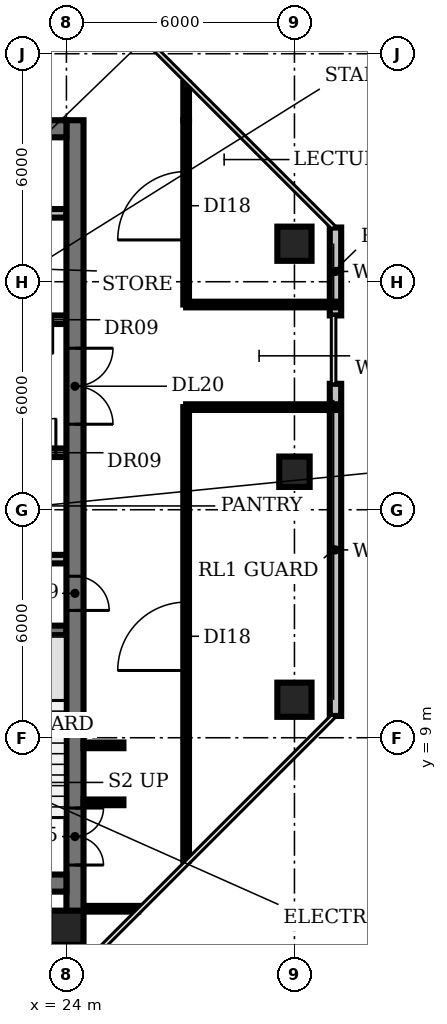
"""IFC4 building model, lengths in metres.
Left out: names, types, materials, properties, quantities, classifications, styles, units other than length and angle.
Written with IfcOpenShell. Run it as: python <this file> out.ifc"""

import sys

from ifc_helpers import new_model, si_unit, direction, frame, frame_2d, origin, origin_2d, place, context, subcontext, project, spatial, rectangle, circle, extrude, element, fill, save


model = new_model("IFC4")
c1 = context("Model", 3, precision=1e-05, world=origin(), true_north=direction((0.0, 1.0)))
c2 = subcontext(c1, "Body", "Model", "MODEL_VIEW")
j1 = project(units=[si_unit("LENGTHUNIT", "METRE"), si_unit("PLANEANGLEUNIT", "RADIAN")], contexts=[c1])
p1 = place(None, origin())
s1 = spatial("IfcSite", under=j1, at=p1, CompositionType="ELEMENT")
p2 = place(p1, origin())
s2 = spatial("IfcBuilding", under=s1, at=p2, CompositionType="ELEMENT")
p3 = place(p2, frame((0.0, 0.0, 243.2)))
s3 = spatial("IfcBuildingStorey", under=s2, at=p3, CompositionType="ELEMENT", Elevation=243.2)
for number, where, z_axis, x_axis in (
    (1, (24.0, 4.0, 0.0), (0.0, 0.0, 1.0), (1.0, 0.0, 0.0)),
    (2, (30.0, 10.0, 0.0), (0.0, 0.0, 1.0), (1.0, 0.0, 0.0)),
):
    element("IfcColumn", number, at=place(p3, frame(where, z_axis=z_axis, x_axis=x_axis)), inside=s3, PredefinedType="COLUMN", context=c2, shape_type="SweptSolid", body=[
        extrude(circle(Radius=0.45, at=origin_2d()), origin(), (0.0, 0.0, 1.0), 3.85),
    ])
p4 = place(p3, frame((30.0, 16.0, 0.0), z_axis=(0.0, 0.0, 1.0), x_axis=(1.0, 0.0, 0.0)))
e3 = element("IfcColumn", 3, at=p4, inside=s3, PredefinedType="COLUMN", context=c2, shape_type="SweptSolid", body=[
    extrude(rectangle(XDim=0.8, YDim=0.8, at=origin_2d()), origin(), (0.0, 0.0, 1.0), 3.85),
])
p5 = place(p3, frame((30.0, 22.0, 0.0), z_axis=(0.0, 0.0, 1.0), x_axis=(1.0, 0.0, 0.0)))
e4 = element("IfcColumn", 4, at=p5, inside=s3, PredefinedType="COLUMN", context=c2, shape_type="SweptSolid", body=[
    extrude(circle(Radius=0.45, at=origin_2d()), origin(), (0.0, 0.0, 1.0), 3.85),
])
p6 = place(p3, frame((31.08, 9.573, 0.0), z_axis=(0.0, 0.0, 1.0), x_axis=(0.0, 1.0, 0.0)))
e5 = element("IfcWall", 5, at=p6, inside=s3, PredefinedType="SOLIDWALL", context=c2, shape_type="SweptSolid", body=[
    extrude(rectangle(XDim=8.74, YDim=0.3, at=frame_2d((4.37, 0.0))), origin(), (0.0, 0.0, 1.0), 3.85),
])
p7 = place(p3, frame((31.08, 20.113, 0.0), z_axis=(0.0, 0.0, 1.0), x_axis=(0.0, 1.0, 0.0)))
e6 = element("IfcWall", 6, at=p7, inside=s3, PredefinedType="SOLIDWALL", context=c2, shape_type="SweptSolid", body=[
    extrude(rectangle(XDim=2.313, YDim=0.3, at=frame_2d((1.157, 0.0))), origin(), (0.0, 0.0, 1.0), 3.85),
])
p8 = place(p3, frame((20.85, 11.825, 0.0), z_axis=(0.0, 0.0, 1.0), x_axis=(1.0, 0.0, 0.0)))
e7 = element("IfcWall", 7, at=p8, inside=s3, PredefinedType="SHEAR", context=c2, shape_type="SweptSolid", body=[
    extrude(rectangle(XDim=3.15, YDim=0.25, at=frame_2d((1.575, 0.0))), origin(), (0.0, 0.0, 1.0), 3.85),
])
p9 = place(p3, frame((16.6, 13.7, 0.0), z_axis=(0.0, 0.0, 1.0), x_axis=(1.0, 0.0, 0.0)))
e8 = element("IfcWall", 8, at=p9, inside=s3, PredefinedType="PARTITIONING", context=c2, shape_type="SweptSolid", body=[
    extrude(rectangle(XDim=7.4, YDim=0.225, at=frame_2d((3.7, 0.0))), origin(), (0.0, 0.0, 1.0), 3.85),
])
p10 = place(p3, frame((9.4, 16.5, 0.0), z_axis=(0.0, 0.0, 1.0), x_axis=(1.0, 0.0, 0.0)))
e9 = element("IfcWall", 9, at=p10, inside=s3, PredefinedType="PARTITIONING", context=c2, shape_type="SweptSolid", body=[
    extrude(rectangle(XDim=14.6, YDim=0.225, at=frame_2d((7.3, 0.0))), origin(), (0.0, 0.0, 1.0), 3.85),
])
p11 = place(p10, frame((0.55, 0.0, 0.0)))
e10 = element("IfcOpeningElement", 10, at=p11, cuts=e9, PredefinedType="OPENING", context=c2, shape_type="SweptSolid", body=[
    extrude(rectangle(XDim=0.9, YDim=2.1, at=frame_2d((0.45, 1.05))), frame((0.0, 0.123, 0.0), z_axis=(0.0, -1.0, 0.0), x_axis=(1.0, 0.0, 0.0)), (0.0, 0.0, 1.0), 0.245),
])
p12 = place(p10, frame((6.075, 0.0, 0.0)))
e11 = element("IfcOpeningElement", 11, at=p12, cuts=e9, PredefinedType="OPENING", context=c2, shape_type="SweptSolid", body=[
    extrude(rectangle(XDim=1.0, YDim=2.1, at=frame_2d((0.5, 1.05))), frame((0.0, 0.123, 0.0), z_axis=(0.0, -1.0, 0.0), x_axis=(1.0, 0.0, 0.0)), (0.0, 0.0, 1.0), 0.245),
])
p13 = place(p10, frame((11.647, 0.0, 0.0)))
e12 = element("IfcOpeningElement", 12, at=p13, cuts=e9, PredefinedType="OPENING", context=c2, shape_type="SweptSolid", body=[
    extrude(rectangle(XDim=0.9, YDim=2.1, at=frame_2d((0.45, 1.05))), frame((0.0, 0.123, 0.0), z_axis=(0.0, -1.0, 0.0), x_axis=(1.0, 0.0, 0.0)), (0.0, 0.0, 1.0), 0.245),
])
p14 = place(p10, frame((13.423, 0.0, 0.0)))
e13 = element("IfcOpeningElement", 13, at=p14, cuts=e9, PredefinedType="OPENING", context=c2, shape_type="SweptSolid", body=[
    extrude(rectangle(XDim=0.9, YDim=2.1, at=frame_2d((0.45, 1.05))), frame((0.0, 0.123, 0.0), z_axis=(0.0, -1.0, 0.0), x_axis=(1.0, 0.0, 0.0)), (0.0, 0.0, 1.0), 0.245),
])
p15 = place(p3, frame((24.0, 20.0, 0.0), z_axis=(0.0, 0.0, 1.0), x_axis=(-1.0, 0.0, 0.0)))
e14 = element("IfcWall", 14, at=p15, inside=s3, PredefinedType="PARTITIONING", context=c2, shape_type="SweptSolid", body=[
    extrude(rectangle(XDim=14.6, YDim=0.225, at=frame_2d((7.3, 0.0))), origin(), (0.0, 0.0, 1.0), 3.85),
])
p16 = place(p15, frame((12.75, 0.0, 0.0)))
e15 = element("IfcOpeningElement", 15, at=p16, cuts=e14, PredefinedType="OPENING", context=c2, shape_type="SweptSolid", body=[
    extrude(rectangle(XDim=1.1, YDim=2.1, at=frame_2d((0.55, 1.05))), frame((0.0, 0.123, 0.0), z_axis=(0.0, -1.0, 0.0), x_axis=(1.0, 0.0, 0.0)), (0.0, 0.0, 1.0), 0.245),
])
p17 = place(p15, frame((9.95, 0.0, 0.0)))
e16 = element("IfcOpeningElement", 16, at=p17, cuts=e14, PredefinedType="OPENING", context=c2, shape_type="SweptSolid", body=[
    extrude(rectangle(XDim=1.1, YDim=2.1, at=frame_2d((0.55, 1.05))), frame((0.0, 0.123, 0.0), z_axis=(0.0, -1.0, 0.0), x_axis=(1.0, 0.0, 0.0)), (0.0, 0.0, 1.0), 0.245),
])
p18 = place(p15, frame((7.15, 0.0, 0.0)))
e17 = element("IfcOpeningElement", 17, at=p18, cuts=e14, PredefinedType="OPENING", context=c2, shape_type="SweptSolid", body=[
    extrude(rectangle(XDim=1.1, YDim=2.1, at=frame_2d((0.55, 1.05))), frame((0.0, 0.123, 0.0), z_axis=(0.0, -1.0, 0.0), x_axis=(1.0, 0.0, 0.0)), (0.0, 0.0, 1.0), 0.245),
])
p19 = place(p15, frame((4.35, 0.0, 0.0)))
e18 = element("IfcOpeningElement", 18, at=p19, cuts=e14, PredefinedType="OPENING", context=c2, shape_type="SweptSolid", body=[
    extrude(rectangle(XDim=1.1, YDim=2.1, at=frame_2d((0.55, 1.05))), frame((0.0, 0.123, 0.0), z_axis=(0.0, -1.0, 0.0), x_axis=(1.0, 0.0, 0.0)), (0.0, 0.0, 1.0), 0.245),
])
p20 = place(p15, frame((2.137, 0.0, 0.0)))
e19 = element("IfcOpeningElement", 19, at=p20, cuts=e14, PredefinedType="OPENING", context=c2, shape_type="SweptSolid", body=[
    extrude(rectangle(XDim=0.9, YDim=2.1, at=frame_2d((0.45, 1.05))), frame((0.0, 0.123, 0.0), z_axis=(0.0, -1.0, 0.0), x_axis=(1.0, 0.0, 0.0)), (0.0, 0.0, 1.0), 0.245),
])
p21 = place(p15, frame((0.363, 0.0, 0.0)))
e20 = element("IfcOpeningElement", 20, at=p21, cuts=e14, PredefinedType="OPENING", context=c2, shape_type="SweptSolid", body=[
    extrude(rectangle(XDim=0.9, YDim=2.1, at=frame_2d((0.45, 1.05))), frame((0.0, 0.123, 0.0), z_axis=(0.0, -1.0, 0.0), x_axis=(1.0, 0.0, 0.0)), (0.0, 0.0, 1.0), 0.245),
])
p22 = place(p3, frame((9.4, 22.8, 0.0), z_axis=(0.0, 0.0, 1.0), x_axis=(1.0, 0.0, 0.0)))
e21 = element("IfcWall", 21, at=p22, inside=s3, PredefinedType="PARTITIONING", context=c2, shape_type="SweptSolid", body=[
    extrude(rectangle(XDim=14.6, YDim=0.225, at=frame_2d((7.3, 0.0))), origin(), (0.0, 0.0, 1.0), 3.85),
])
p23 = place(p3, frame((24.225, 25.25, 0.0), z_axis=(0.0, 0.0, 1.0), x_axis=(0.0, -1.0, 0.0)))
e22 = element("IfcWall", 22, at=p23, inside=s3, PredefinedType="SHEAR", context=c2, shape_type="SweptSolid", body=[
    extrude(rectangle(XDim=20.83, YDim=0.45, at=frame_2d((10.415, 0.0))), origin(), (0.0, 0.0, 1.0), 3.85),
])
p24 = place(p23, frame((18.1, 0.0, 0.0)))
e23 = element("IfcOpeningElement", 23, at=p24, cuts=e22, PredefinedType="OPENING", context=c2, shape_type="SweptSolid", body=[
    extrude(rectangle(XDim=1.5, YDim=2.1, at=frame_2d((0.75, 1.05))), frame((0.0, 0.235, 0.0), z_axis=(0.0, -1.0, 0.0), x_axis=(1.0, 0.0, 0.0)), (0.0, 0.0, 1.0), 0.47),
])
p25 = place(p23, frame((12.0, 0.0, 0.0)))
e24 = element("IfcOpeningElement", 24, at=p25, cuts=e22, PredefinedType="OPENING", context=c2, shape_type="SweptSolid", body=[
    extrude(rectangle(XDim=0.9, YDim=2.1, at=frame_2d((0.45, 1.05))), frame((0.0, 0.235, 0.0), z_axis=(0.0, -1.0, 0.0), x_axis=(1.0, 0.0, 0.0)), (0.0, 0.0, 1.0), 0.47),
])
p26 = place(p23, frame((6.0, 0.0, 0.0)))
e25 = element("IfcOpeningElement", 25, at=p26, cuts=e22, PredefinedType="OPENING", context=c2, shape_type="SweptSolid", body=[
    extrude(rectangle(XDim=2.0, YDim=2.1, at=frame_2d((1.0, 1.05))), frame((0.0, 0.235, 0.0), z_axis=(0.0, -1.0, 0.0), x_axis=(1.0, 0.0, 0.0)), (0.0, 0.0, 1.0), 0.47),
])
p27 = place(p3, frame((24.0, 5.175, 0.0), z_axis=(0.0, 0.0, 1.0), x_axis=(-1.0, 0.0, 0.0)))
e26 = element("IfcWall", 26, at=p27, inside=s3, PredefinedType="SHEAR", context=c2, shape_type="SweptSolid", body=[
    extrude(rectangle(XDim=18.0, YDim=0.45, at=frame_2d((9.0, 0.0))), origin(), (0.0, 0.0, 1.0), 3.85),
])
p28 = place(p27, frame((0.825, 0.0, 0.0)))
e27 = element("IfcOpeningElement", 27, at=p28, cuts=e26, PredefinedType="OPENING", context=c2, shape_type="SweptSolid", body=[
    extrude(rectangle(XDim=1.5, YDim=2.1, at=frame_2d((0.75, 1.05))), frame((0.0, 0.235, 0.0), z_axis=(0.0, -1.0, 0.0), x_axis=(1.0, 0.0, 0.0)), (0.0, 0.0, 1.0), 0.47),
])
p29 = place(p27, frame((15.675, 0.0, 0.0)))
e28 = element("IfcOpeningElement", 28, at=p29, cuts=e26, PredefinedType="OPENING", context=c2, shape_type="SweptSolid", body=[
    extrude(rectangle(XDim=1.5, YDim=2.1, at=frame_2d((0.75, 1.05))), frame((0.0, 0.235, 0.0), z_axis=(0.0, -1.0, 0.0), x_axis=(1.0, 0.0, 0.0)), (0.0, 0.0, 1.0), 0.47),
])
p30 = place(p27, frame((13.0, 0.0, 0.0)))
e29 = element("IfcOpeningElement", 29, at=p30, cuts=e26, PredefinedType="OPENING", context=c2, shape_type="SweptSolid", body=[
    extrude(rectangle(XDim=1.2, YDim=2.1, at=frame_2d((0.6, 1.05))), frame((0.0, 0.235, 0.0), z_axis=(0.0, -1.0, 0.0), x_axis=(1.0, 0.0, 0.0)), (0.0, 0.0, 1.0), 0.47),
])
p31 = place(p27, frame((4.4, 0.0, 0.0)))
e30 = element("IfcOpeningElement", 30, at=p31, cuts=e26, PredefinedType="OPENING", context=c2, shape_type="SweptSolid", body=[
    extrude(rectangle(XDim=1.0, YDim=2.1, at=frame_2d((0.5, 1.05))), frame((0.0, 0.235, 0.0), z_axis=(0.0, -1.0, 0.0), x_axis=(1.0, 0.0, 0.0)), (0.0, 0.0, 1.0), 0.47),
])
p32 = place(p3, frame((6.0, 25.025, 0.0), z_axis=(0.0, 0.0, 1.0), x_axis=(1.0, 0.0, 0.0)))
e31 = element("IfcWall", 31, at=p32, inside=s3, PredefinedType="SHEAR", context=c2, shape_type="SweptSolid", body=[
    extrude(rectangle(XDim=18.0, YDim=0.45, at=frame_2d((9.0, 0.0))), origin(), (0.0, 0.0, 1.0), 3.85),
])
for number, where, z_axis, x_axis in (
    (32, (24.45, 7.3, 0.0), (0.0, 0.0, 1.0), (1.0, 0.0, 0.0)),
    (33, (24.45, 8.8, 0.0), (0.0, 0.0, 1.0), (1.0, 0.0, 0.0)),
):
    element("IfcWall", number, at=place(p3, frame(where, z_axis=z_axis, x_axis=x_axis)), inside=s3, PredefinedType="PARTITIONING", context=c2, shape_type="SweptSolid", body=[
        extrude(rectangle(XDim=1.05, YDim=0.15, at=frame_2d((0.525, 0.0))), origin(), (0.0, 0.0, 1.0), 2.88),
    ])
p33 = place(p3, frame((24.55, 4.5, 0.0), z_axis=(0.0, 0.0, 1.0), x_axis=(1.0, 0.0, 0.0)))
e34 = element("IfcWall", 34, at=p33, inside=s3, PredefinedType="PARTITIONING", context=c2, shape_type="SweptSolid", body=[
    extrude(rectangle(XDim=1.34, YDim=0.15, at=frame_2d((0.67, 0.0))), origin(), (0.0, 0.0, 1.0), 2.88),
])
p34 = place(p3, frame((27.15, 5.77, 0.0), z_axis=(0.0, 0.0, 1.0), x_axis=(0.0, 1.0, 0.0)))
e35 = element("IfcWall", 35, at=p34, inside=s3, PredefinedType="PARTITIONING", context=c2, shape_type="SweptSolid", body=[
    extrude(rectangle(XDim=11.93, YDim=0.15, at=frame_2d((5.965, 0.0))), origin(), (0.0, 0.0, 1.0), 2.88),
])
p35 = place(p34, frame((5.0, 0.0, 0.0)))
e36 = element("IfcOpeningElement", 36, at=p35, cuts=e35, PredefinedType="OPENING", context=c2, shape_type="SweptSolid", body=[
    extrude(rectangle(XDim=1.8, YDim=2.1, at=frame_2d((0.9, 1.05))), frame((0.0, 0.085, 0.0), z_axis=(0.0, -1.0, 0.0), x_axis=(1.0, 0.0, 0.0)), (0.0, 0.0, 1.0), 0.17),
])
p36 = place(p3, frame((27.15, 17.7, 0.0), z_axis=(0.0, 0.0, 1.0), x_axis=(1.0, 0.0, 0.0)))
e37 = element("IfcWall", 37, at=p36, inside=s3, PredefinedType="PARTITIONING", context=c2, shape_type="SweptSolid", body=[
    extrude(rectangle(XDim=3.94, YDim=0.15, at=frame_2d((1.97, 0.0))), origin(), (0.0, 0.0, 1.0), 2.88),
])
p37 = place(p3, frame((27.15, 20.4, 0.0), z_axis=(0.0, 0.0, 1.0), x_axis=(0.0, 1.0, 0.0)))
e38 = element("IfcWall", 38, at=p37, inside=s3, PredefinedType="PARTITIONING", context=c2, shape_type="SweptSolid", body=[
    extrude(rectangle(XDim=4.85, YDim=0.15, at=frame_2d((2.425, 0.0))), origin(), (0.0, 0.0, 1.0), 2.88),
])
p38 = place(p37, frame((1.7, 0.0, 0.0)))
e39 = element("IfcOpeningElement", 39, at=p38, cuts=e38, PredefinedType="OPENING", context=c2, shape_type="SweptSolid", body=[
    extrude(rectangle(XDim=1.8, YDim=2.1, at=frame_2d((0.9, 1.05))), frame((0.0, 0.085, 0.0), z_axis=(0.0, -1.0, 0.0), x_axis=(1.0, 0.0, 0.0)), (0.0, 0.0, 1.0), 0.17),
])
p39 = place(p3, frame((27.15, 20.4, 0.0), z_axis=(0.0, 0.0, 1.0), x_axis=(1.0, 0.0, 0.0)))
e40 = element("IfcWall", 40, at=p39, inside=s3, PredefinedType="PARTITIONING", context=c2, shape_type="SweptSolid", body=[
    extrude(rectangle(XDim=3.94, YDim=0.15, at=frame_2d((1.97, 0.0))), origin(), (0.0, 0.0, 1.0), 2.88),
])
p40 = place(p3, frame((27.15, 25.25, 0.0), z_axis=(0.0, 0.0, 1.0), x_axis=(0.0, 1.0, 0.0)))
e41 = element("IfcWall", 41, at=p40, inside=s3, PredefinedType="PARTITIONING", context=c2, shape_type="SweptSolid", body=[
    extrude(rectangle(XDim=0.98, YDim=0.15, at=frame_2d((0.49, 0.0))), origin(), (0.0, 0.0, 1.0), 2.88),
])
p41 = place(p14, origin())
e42 = element("IfcDoor", 42, at=p41, inside=s3, OperationType="SINGLE_SWING_RIGHT", PredefinedType="DOOR", context=c2, shape_type="SweptSolid", body=[
    extrude(rectangle(XDim=0.9, YDim=2.1, at=frame_2d((0.45, 1.05))), frame((0.0, 0.025, 0.0), z_axis=(0.0, -1.0, 0.0), x_axis=(1.0, 0.0, 0.0)), (0.0, 0.0, 1.0), 0.05),
])
fill(e13, e42)
p42 = place(p21, origin())
e43 = element("IfcDoor", 43, at=p42, inside=s3, OperationType="SINGLE_SWING_LEFT", PredefinedType="DOOR", context=c2, shape_type="SweptSolid", body=[
    extrude(rectangle(XDim=0.9, YDim=2.1, at=frame_2d((0.45, 1.05))), frame((0.0, 0.025, 0.0), z_axis=(0.0, -1.0, 0.0), x_axis=(1.0, 0.0, 0.0)), (0.0, 0.0, 1.0), 0.05),
])
fill(e20, e43)
p43 = place(p24, origin())
e44 = element("IfcDoor", 44, at=p43, inside=s3, OperationType="DOUBLE_DOOR_SINGLE_SWING", PredefinedType="DOOR", context=c2, shape_type="SweptSolid", body=[
    extrude(rectangle(XDim=1.5, YDim=2.1, at=frame_2d((0.75, 1.05))), frame((0.0, 0.025, 0.0), z_axis=(0.0, -1.0, 0.0), x_axis=(1.0, 0.0, 0.0)), (0.0, 0.0, 1.0), 0.05),
])
fill(e23, e44)
p44 = place(p25, origin())
e45 = element("IfcDoor", 45, at=p44, inside=s3, OperationType="SINGLE_SWING_RIGHT", PredefinedType="DOOR", context=c2, shape_type="SweptSolid", body=[
    extrude(rectangle(XDim=0.9, YDim=2.1, at=frame_2d((0.45, 1.05))), frame((0.0, 0.025, 0.0), z_axis=(0.0, -1.0, 0.0), x_axis=(1.0, 0.0, 0.0)), (0.0, 0.0, 1.0), 0.05),
])
fill(e24, e45)
p45 = place(p26, origin())
e46 = element("IfcDoor", 46, at=p45, inside=s3, OperationType="DOUBLE_DOOR_SINGLE_SWING", PredefinedType="DOOR", context=c2, shape_type="SweptSolid", body=[
    extrude(rectangle(XDim=2.0, YDim=2.1, at=frame_2d((1.0, 1.05))), frame((0.0, 0.025, 0.0), z_axis=(0.0, -1.0, 0.0), x_axis=(1.0, 0.0, 0.0)), (0.0, 0.0, 1.0), 0.05),
])
fill(e25, e46)
p46 = place(p35, origin())
e47 = element("IfcDoor", 47, at=p46, inside=s3, OperationType="SINGLE_SWING_LEFT", PredefinedType="DOOR", context=c2, shape_type="SweptSolid", body=[
    extrude(rectangle(XDim=1.8, YDim=2.1, at=frame_2d((0.9, 1.05))), frame((0.0, 0.025, 0.0), z_axis=(0.0, -1.0, 0.0), x_axis=(1.0, 0.0, 0.0)), (0.0, 0.0, 1.0), 0.05),
])
fill(e36, e47)
p47 = place(p38, origin())
e48 = element("IfcDoor", 48, at=p47, inside=s3, OperationType="SINGLE_SWING_LEFT", PredefinedType="DOOR", context=c2, shape_type="SweptSolid", body=[
    extrude(rectangle(XDim=1.8, YDim=2.1, at=frame_2d((0.9, 1.05))), frame((0.0, 0.025, 0.0), z_axis=(0.0, -1.0, 0.0), x_axis=(1.0, 0.0, 0.0)), (0.0, 0.0, 1.0), 0.05),
])
fill(e39, e48)
save(model, sys.argv[1])
